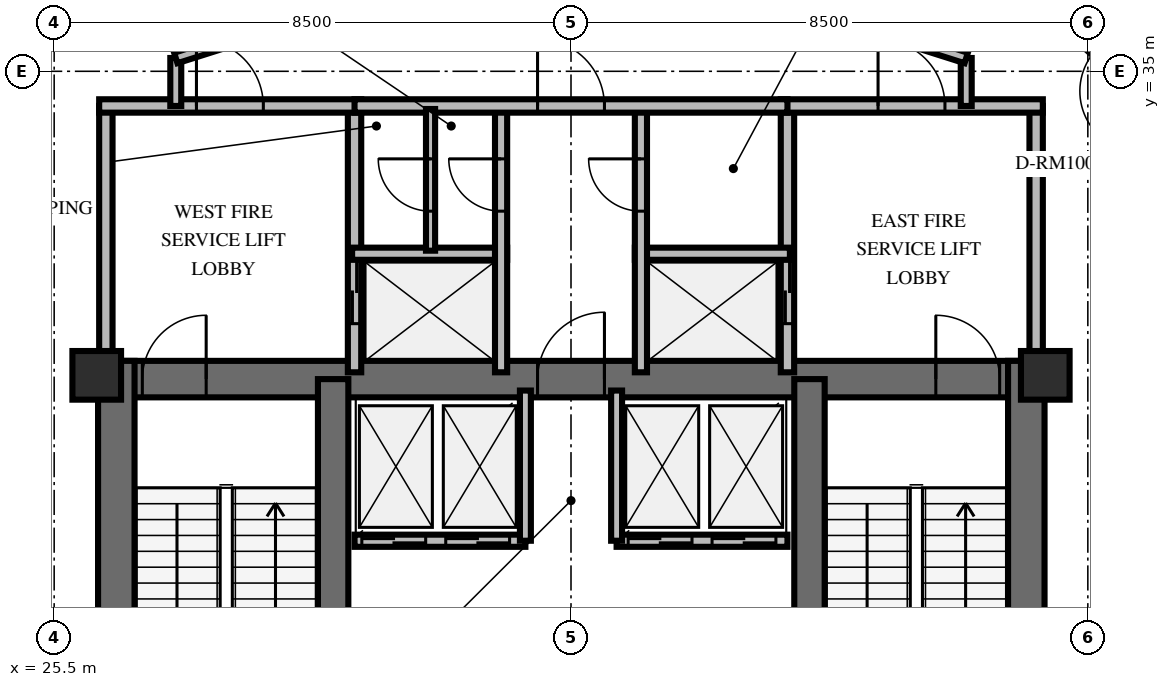
"""IFC4 building model, lengths in metres.
Left out: names, types, materials, properties, quantities, classifications, styles, units other than length and angle.
Written with IfcOpenShell. Run it as: python <this file> out.ifc"""

import sys

from ifc_helpers import new_model, si_unit, direction, frame, frame_2d, origin, origin_2d, place, context, subcontext, project, spatial, rectangle, extrude, element, fill, save


model = new_model("IFC4")
c1 = context("Model", 3, precision=1e-05, world=origin(), true_north=direction((0.0, 1.0)))
c2 = subcontext(c1, "Body", "Model", "MODEL_VIEW")
j1 = project(units=[si_unit("LENGTHUNIT", "METRE"), si_unit("PLANEANGLEUNIT", "RADIAN")], contexts=[c1])
p1 = place(None, origin())
s1 = spatial("IfcSite", under=j1, at=p1, CompositionType="ELEMENT")
p2 = place(p1, origin())
s2 = spatial("IfcBuilding", under=s1, at=p2, CompositionType="ELEMENT")
p3 = place(p2, frame((0.0, 0.0, 259.2)))
s3 = spatial("IfcBuildingStorey", under=s2, at=p3, CompositionType="ELEMENT", Elevation=259.2)
p4 = place(p3, frame((26.222, 29.938, 0.0), z_axis=(0.0, 0.0, 1.0), x_axis=(1.0, 0.0, 0.0)))
e1 = element("IfcWall", 1, at=p4, inside=s3, PredefinedType="SHEAR", context=c2, shape_type="SweptSolid", body=[
    extrude(rectangle(XDim=15.566, YDim=0.6, at=frame_2d((7.783, 0.0))), origin(), (0.0, 0.0, 1.0), 3.6),
])
p5 = place(p4, frame((0.728, 0.0, 0.0)))
e2 = element("IfcOpeningElement", 2, at=p5, cuts=e1, PredefinedType="OPENING", context=c2, shape_type="SweptSolid", body=[
    extrude(rectangle(XDim=1.05, YDim=2.15, at=frame_2d((0.525, 1.075))), frame((0.0, 0.31, 0.0), z_axis=(0.0, -1.0, 0.0), x_axis=(1.0, 0.0, 0.0)), (0.0, 0.0, 1.0), 0.62),
])
p6 = place(p4, frame((13.778, 0.0, 0.0)))
e3 = element("IfcOpeningElement", 3, at=p6, cuts=e1, PredefinedType="OPENING", context=c2, shape_type="SweptSolid", body=[
    extrude(rectangle(XDim=1.05, YDim=2.15, at=frame_2d((0.525, 1.075))), frame((0.0, 0.31, 0.0), z_axis=(0.0, -1.0, 0.0), x_axis=(1.0, 0.0, 0.0)), (0.0, 0.0, 1.0), 0.62),
])
p7 = place(p4, frame((7.228, 0.0, 0.0)))
e4 = element("IfcOpeningElement", 4, at=p7, cuts=e1, PredefinedType="OPENING", context=c2, shape_type="SweptSolid", body=[
    extrude(rectangle(XDim=1.1, YDim=2.15, at=frame_2d((0.55, 1.075))), frame((0.0, 0.31, 0.0), z_axis=(0.0, -1.0, 0.0), x_axis=(1.0, 0.0, 0.0)), (0.0, 0.0, 1.0), 0.62),
])
for number, where, z_axis, x_axis in (
    (5, (26.522, 19.962, 0.0), (0.0, 0.0, 1.0), (0.0, 1.0, 0.0)),
    (6, (41.488, 19.962, 0.0), (0.0, 0.0, 1.0), (0.0, 1.0, 0.0)),
):
    element("IfcWall", number, at=place(p3, frame(where, z_axis=z_axis, x_axis=x_axis)), inside=s3, PredefinedType="SHEAR", context=c2, shape_type="SweptSolid", body=[
        extrude(rectangle(XDim=10.276, YDim=0.6, at=frame_2d((5.138, 0.0))), origin(), (0.0, 0.0, 1.0), 3.6),
    ])
for number, where, z_axis, x_axis in (
    (7, (30.088, 20.262, 0.0), (0.0, 0.0, 1.0), (0.0, 1.0, 0.0)),
    (8, (37.922, 20.262, 0.0), (0.0, 0.0, 1.0), (0.0, 1.0, 0.0)),
):
    element("IfcWall", number, at=place(p3, frame(where, z_axis=z_axis, x_axis=x_axis)), inside=s3, PredefinedType="SHEAR", context=c2, shape_type="SweptSolid", body=[
        extrude(rectangle(XDim=9.676, YDim=0.5, at=frame_2d((4.838, 0.0))), origin(), (0.0, 0.0, 1.0), 3.6),
    ])
for number, where, z_axis, x_axis in (
    (9, (26.2, 30.0, 0.0), (0.0, 0.0, 1.0), (1.0, 0.0, 0.0)),
    (10, (41.8, 30.0, 0.0), (0.0, 0.0, 1.0), (1.0, 0.0, 0.0)),
):
    element("IfcColumn", number, at=place(p3, frame(where, z_axis=z_axis, x_axis=x_axis)), inside=s3, PredefinedType="PILASTER", context=c2, shape_type="SweptSolid", body=[
        extrude(rectangle(XDim=0.8, YDim=0.8, at=origin_2d()), origin(), (0.0, 0.0, 1.0), 3.6),
    ])
p8 = place(p3, frame((26.35, 30.05, 0.0), z_axis=(0.0, 0.0, 1.0), x_axis=(0.0, 1.0, 0.0)))
e11 = element("IfcWall", 11, at=p8, inside=s3, PredefinedType="SOLIDWALL", context=c2, shape_type="SweptSolid", body=[
    extrude(rectangle(XDim=4.38, YDim=0.22, at=frame_2d((2.19, 0.0))), origin(), (0.0, 0.0, 1.0), 2.46),
])
p9 = place(p3, frame((30.44, 30.05, 0.0), z_axis=(0.0, 0.0, 1.0), x_axis=(0.0, 1.0, 0.0)))
e12 = element("IfcWall", 12, at=p9, inside=s3, PredefinedType="SOLIDWALL", context=c2, shape_type="SweptSolid", body=[
    extrude(rectangle(XDim=4.38, YDim=0.22, at=frame_2d((2.19, 0.0))), origin(), (0.0, 0.0, 1.0), 2.46),
])
p10 = place(p9, frame((0.8, 0.0, 0.0)))
e13 = element("IfcOpeningElement", 13, at=p10, cuts=e12, PredefinedType="OPENING", context=c2, shape_type="SweptSolid", body=[
    extrude(rectangle(XDim=1.05, YDim=2.1, at=frame_2d((0.525, 1.05))), frame((0.0, 0.12, 0.0), z_axis=(0.0, -1.0, 0.0), x_axis=(1.0, 0.0, 0.0)), (0.0, 0.0, 1.0), 0.24),
])
p11 = place(p3, frame((26.24, 34.43, 0.0), z_axis=(0.0, 0.0, 1.0), x_axis=(1.0, 0.0, 0.0)))
e14 = element("IfcWall", 14, at=p11, inside=s3, PredefinedType="SOLIDWALL", context=c2, shape_type="SweptSolid", body=[
    extrude(rectangle(XDim=4.31, YDim=0.22, at=frame_2d((2.155, 0.0))), origin(), (0.0, 0.0, 1.0), 2.46),
])
p12 = place(p11, frame((1.6, 0.0, 0.0)))
e15 = element("IfcOpeningElement", 15, at=p12, cuts=e14, PredefinedType="OPENING", context=c2, shape_type="SweptSolid", body=[
    extrude(rectangle(XDim=1.1, YDim=2.15, at=frame_2d((0.55, 1.075))), frame((0.0, 0.12, 0.0), z_axis=(0.0, -1.0, 0.0), x_axis=(1.0, 0.0, 0.0)), (0.0, 0.0, 1.0), 0.24),
])
p13 = place(p3, frame((30.4, 32.0, 0.0), z_axis=(0.0, 0.0, 1.0), x_axis=(1.0, 0.0, 0.0)))
e16 = element("IfcWall", 16, at=p13, inside=s3, PredefinedType="SOLIDWALL", context=c2, shape_type="SweptSolid", body=[
    extrude(rectangle(XDim=2.55, YDim=0.2, at=frame_2d((1.275, 0.0))), origin(), (0.0, 0.0, 1.0), 2.46),
])
p14 = place(p3, frame((32.85, 30.05, 0.0), z_axis=(0.0, 0.0, 1.0), x_axis=(0.0, 1.0, 0.0)))
e17 = element("IfcWall", 17, at=p14, inside=s3, PredefinedType="SOLIDWALL", context=c2, shape_type="SweptSolid", body=[
    extrude(rectangle(XDim=4.38, YDim=0.2, at=frame_2d((2.19, 0.0))), origin(), (0.0, 0.0, 1.0), 2.46),
])
p15 = place(p14, frame((2.65, 0.0, 0.0)))
e18 = element("IfcOpeningElement", 18, at=p15, cuts=e17, PredefinedType="OPENING", context=c2, shape_type="SweptSolid", body=[
    extrude(rectangle(XDim=0.86, YDim=2.05, at=frame_2d((0.43, 1.025))), frame((0.0, 0.11, 0.0), z_axis=(0.0, -1.0, 0.0), x_axis=(1.0, 0.0, 0.0)), (0.0, 0.0, 1.0), 0.22),
])
p16 = place(p3, frame((37.56, 30.05, 0.0), z_axis=(0.0, 0.0, 1.0), x_axis=(0.0, 1.0, 0.0)))
e19 = element("IfcWall", 19, at=p16, inside=s3, PredefinedType="SOLIDWALL", context=c2, shape_type="SweptSolid", body=[
    extrude(rectangle(XDim=4.38, YDim=0.22, at=frame_2d((2.19, 0.0))), origin(), (0.0, 0.0, 1.0), 2.46),
])
p17 = place(p16, frame((0.8, 0.0, 0.0)))
e20 = element("IfcOpeningElement", 20, at=p17, cuts=e19, PredefinedType="OPENING", context=c2, shape_type="SweptSolid", body=[
    extrude(rectangle(XDim=1.05, YDim=2.1, at=frame_2d((0.525, 1.05))), frame((0.0, 0.12, 0.0), z_axis=(0.0, -1.0, 0.0), x_axis=(1.0, 0.0, 0.0)), (0.0, 0.0, 1.0), 0.24),
])
p18 = place(p3, frame((41.65, 30.05, 0.0), z_axis=(0.0, 0.0, 1.0), x_axis=(0.0, 1.0, 0.0)))
e21 = element("IfcWall", 21, at=p18, inside=s3, PredefinedType="SOLIDWALL", context=c2, shape_type="SweptSolid", body=[
    extrude(rectangle(XDim=4.38, YDim=0.22, at=frame_2d((2.19, 0.0))), origin(), (0.0, 0.0, 1.0), 2.46),
])
p19 = place(p3, frame((37.45, 34.43, 0.0), z_axis=(0.0, 0.0, 1.0), x_axis=(1.0, 0.0, 0.0)))
e22 = element("IfcWall", 22, at=p19, inside=s3, PredefinedType="SOLIDWALL", context=c2, shape_type="SweptSolid", body=[
    extrude(rectangle(XDim=4.31, YDim=0.22, at=frame_2d((2.155, 0.0))), origin(), (0.0, 0.0, 1.0), 2.46),
])
p20 = place(p19, frame((1.6, 0.0, 0.0)))
e23 = element("IfcOpeningElement", 23, at=p20, cuts=e22, PredefinedType="OPENING", context=c2, shape_type="SweptSolid", body=[
    extrude(rectangle(XDim=1.1, YDim=2.15, at=frame_2d((0.55, 1.075))), frame((0.0, 0.12, 0.0), z_axis=(0.0, -1.0, 0.0), x_axis=(1.0, 0.0, 0.0)), (0.0, 0.0, 1.0), 0.24),
])
p21 = place(p3, frame((35.05, 32.0, 0.0), z_axis=(0.0, 0.0, 1.0), x_axis=(1.0, 0.0, 0.0)))
e24 = element("IfcWall", 24, at=p21, inside=s3, PredefinedType="SOLIDWALL", context=c2, shape_type="SweptSolid", body=[
    extrude(rectangle(XDim=2.55, YDim=0.2, at=frame_2d((1.275, 0.0))), origin(), (0.0, 0.0, 1.0), 2.46),
])
p22 = place(p3, frame((35.15, 30.05, 0.0), z_axis=(0.0, 0.0, 1.0), x_axis=(0.0, 1.0, 0.0)))
e25 = element("IfcWall", 25, at=p22, inside=s3, PredefinedType="SOLIDWALL", context=c2, shape_type="SweptSolid", body=[
    extrude(rectangle(XDim=4.38, YDim=0.2, at=frame_2d((2.19, 0.0))), origin(), (0.0, 0.0, 1.0), 2.46),
])
p23 = place(p22, frame((2.65, 0.0, 0.0)))
e26 = element("IfcOpeningElement", 26, at=p23, cuts=e25, PredefinedType="OPENING", context=c2, shape_type="SweptSolid", body=[
    extrude(rectangle(XDim=0.86, YDim=2.05, at=frame_2d((0.43, 1.025))), frame((0.0, 0.11, 0.0), z_axis=(0.0, -1.0, 0.0), x_axis=(1.0, 0.0, 0.0)), (0.0, 0.0, 1.0), 0.22),
])
p24 = place(p3, frame((30.44, 34.43, 0.0), z_axis=(0.0, 0.0, 1.0), x_axis=(1.0, 0.0, 0.0)))
e27 = element("IfcWall", 27, at=p24, inside=s3, PredefinedType="SOLIDWALL", context=c2, shape_type="SweptSolid", body=[
    extrude(rectangle(XDim=7.12, YDim=0.22, at=frame_2d((3.56, 0.0))), origin(), (0.0, 0.0, 1.0), 2.46),
])
p25 = place(p24, frame((3.01, 0.0, 0.0)))
e28 = element("IfcOpeningElement", 28, at=p25, cuts=e27, PredefinedType="OPENING", context=c2, shape_type="SweptSolid", body=[
    extrude(rectangle(XDim=1.1, YDim=2.15, at=frame_2d((0.55, 1.075))), frame((0.0, 0.12, 0.0), z_axis=(0.0, -1.0, 0.0), x_axis=(1.0, 0.0, 0.0)), (0.0, 0.0, 1.0), 0.24),
])
p26 = place(p3, frame((31.69, 32.05, 0.0), z_axis=(0.0, 0.0, 1.0), x_axis=(0.0, 1.0, 0.0)))
e29 = element("IfcWall", 29, at=p26, inside=s3, PredefinedType="PARTITIONING", context=c2, shape_type="SweptSolid", body=[
    extrude(rectangle(XDim=2.33, YDim=0.15, at=frame_2d((1.165, 0.0))), origin(), (0.0, 0.0, 1.0), 2.46),
])
p27 = place(p26, frame((0.65, 0.0, 0.0)))
e30 = element("IfcOpeningElement", 30, at=p27, cuts=e29, PredefinedType="OPENING", context=c2, shape_type="SweptSolid", body=[
    extrude(rectangle(XDim=0.86, YDim=2.05, at=frame_2d((0.43, 1.025))), frame((0.0, 0.085, 0.0), z_axis=(0.0, -1.0, 0.0), x_axis=(1.0, 0.0, 0.0)), (0.0, 0.0, 1.0), 0.17),
])
p28 = place(p3, frame((30.44, 27.28, 0.0), z_axis=(0.0, 0.0, 1.0), x_axis=(1.0, 0.0, 0.0)))
e31 = element("IfcWall", 31, at=p28, inside=s3, PredefinedType="SOLIDWALL", context=c2, shape_type="SweptSolid", body=[
    extrude(rectangle(XDim=2.81, YDim=0.2, at=frame_2d((1.405, 0.0))), origin(), (0.0, 0.0, 1.0), 2.46),
])
p29 = place(p28, frame((0.12, 0.0, 0.0)))
e32 = element("IfcOpeningElement", 32, at=p29, cuts=e31, PredefinedType="OPENING", context=c2, shape_type="SweptSolid", body=[
    extrude(rectangle(XDim=1.05, YDim=2.1, at=frame_2d((0.525, 1.05))), frame((0.0, 0.11, 0.0), z_axis=(0.0, -1.0, 0.0), x_axis=(1.0, 0.0, 0.0)), (0.0, 0.0, 1.0), 0.22),
])
p30 = place(p28, frame((1.5, 0.0, 0.0)))
e33 = element("IfcOpeningElement", 33, at=p30, cuts=e31, PredefinedType="OPENING", context=c2, shape_type="SweptSolid", body=[
    extrude(rectangle(XDim=1.05, YDim=2.1, at=frame_2d((0.525, 1.05))), frame((0.0, 0.11, 0.0), z_axis=(0.0, -1.0, 0.0), x_axis=(1.0, 0.0, 0.0)), (0.0, 0.0, 1.0), 0.22),
])
p31 = place(p3, frame((33.25, 27.28, 0.0), z_axis=(0.0, 0.0, 1.0), x_axis=(0.0, 1.0, 0.0)))
e34 = element("IfcWall", 34, at=p31, inside=s3, PredefinedType="SOLIDWALL", context=c2, shape_type="SweptSolid", body=[
    extrude(rectangle(XDim=2.47, YDim=0.18, at=frame_2d((1.235, 0.0))), origin(), (0.0, 0.0, 1.0), 2.46),
])
p32 = place(p3, frame((34.75, 27.28, 0.0), z_axis=(0.0, 0.0, 1.0), x_axis=(1.0, 0.0, 0.0)))
e35 = element("IfcWall", 35, at=p32, inside=s3, PredefinedType="SOLIDWALL", context=c2, shape_type="SweptSolid", body=[
    extrude(rectangle(XDim=2.81, YDim=0.2, at=frame_2d((1.405, 0.0))), origin(), (0.0, 0.0, 1.0), 2.46),
])
p33 = place(p32, frame((0.19, 0.0, 0.0)))
e36 = element("IfcOpeningElement", 36, at=p33, cuts=e35, PredefinedType="OPENING", context=c2, shape_type="SweptSolid", body=[
    extrude(rectangle(XDim=1.05, YDim=2.1, at=frame_2d((0.525, 1.05))), frame((0.0, 0.11, 0.0), z_axis=(0.0, -1.0, 0.0), x_axis=(1.0, 0.0, 0.0)), (0.0, 0.0, 1.0), 0.22),
])
p34 = place(p32, frame((1.57, 0.0, 0.0)))
e37 = element("IfcOpeningElement", 37, at=p34, cuts=e35, PredefinedType="OPENING", context=c2, shape_type="SweptSolid", body=[
    extrude(rectangle(XDim=1.05, YDim=2.1, at=frame_2d((0.525, 1.05))), frame((0.0, 0.11, 0.0), z_axis=(0.0, -1.0, 0.0), x_axis=(1.0, 0.0, 0.0)), (0.0, 0.0, 1.0), 0.22),
])
p35 = place(p3, frame((34.75, 27.28, 0.0), z_axis=(0.0, 0.0, 1.0), x_axis=(0.0, 1.0, 0.0)))
e38 = element("IfcWall", 38, at=p35, inside=s3, PredefinedType="SOLIDWALL", context=c2, shape_type="SweptSolid", body=[
    extrude(rectangle(XDim=2.47, YDim=0.18, at=frame_2d((1.235, 0.0))), origin(), (0.0, 0.0, 1.0), 2.46),
])
for number, where, z_axis, x_axis in (
    (39, (27.5, 34.43, 0.0), (0.0, 0.0, 1.0), (0.0, 1.0, 0.0)),
    (40, (40.5, 35.219, 0.0), (0.0, 0.0, 1.0), (0.0, -1.0, 0.0)),
):
    element("IfcWall", number, at=place(p3, frame(where, z_axis=z_axis, x_axis=x_axis)), inside=s3, PredefinedType="PARTITIONING", context=c2, shape_type="SweptSolid", body=[
        extrude(rectangle(XDim=0.789, YDim=0.18, at=frame_2d((0.395, 0.0))), origin(), (0.0, 0.0, 1.0), 2.46),
    ])
p36 = place(p3, frame((27.5, 35.219, 0.0), z_axis=(0.0, 0.0, 1.0), x_axis=(0.953228121756, 0.302251795518, 0.0)))
e41 = element("IfcWall", 41, at=p36, inside=s3, PredefinedType="PARTITIONING", context=c2, shape_type="SweptSolid", body=[
    extrude(rectangle(XDim=6.819, YDim=0.18, at=frame_2d((3.409, 0.0))), origin(), (0.0, 0.0, 1.0), 2.46),
])
p37 = place(p36, frame((2.86, 0.0, 0.0)))
e42 = element("IfcOpeningElement", 42, at=p37, cuts=e41, PredefinedType="OPENING", context=c2, shape_type="SweptSolid", body=[
    extrude(rectangle(XDim=1.1, YDim=2.15, at=frame_2d((0.55, 1.075))), frame((0.0, 0.1, 0.0), z_axis=(0.0, -1.0, 0.0), x_axis=(1.0, 0.0, 0.0)), (0.0, 0.0, 1.0), 0.2),
])
p38 = place(p3, frame((34.0, 37.28, 0.0), z_axis=(0.0, 0.0, 1.0), x_axis=(0.953228121756, -0.302251795518, 0.0)))
e43 = element("IfcWall", 43, at=p38, inside=s3, PredefinedType="PARTITIONING", context=c2, shape_type="SweptSolid", body=[
    extrude(rectangle(XDim=6.819, YDim=0.18, at=frame_2d((3.409, 0.0))), origin(), (0.0, 0.0, 1.0), 2.46),
])
p39 = place(p38, frame((2.86, 0.0, 0.0)))
e44 = element("IfcOpeningElement", 44, at=p39, cuts=e43, PredefinedType="OPENING", context=c2, shape_type="SweptSolid", body=[
    extrude(rectangle(XDim=1.1, YDim=2.15, at=frame_2d((0.55, 1.075))), frame((0.0, 0.1, 0.0), z_axis=(0.0, -1.0, 0.0), x_axis=(1.0, 0.0, 0.0)), (0.0, 0.0, 1.0), 0.2),
])
p40 = place(p3, frame((43.988, 34.117, 0.0), z_axis=(0.0, 0.0, 1.0), x_axis=(-0.744300239782, 0.6678451565, 0.0)))
e45 = element("IfcWall", 45, at=p40, inside=s3, PredefinedType="PARTITIONING", context=c2, shape_type="SweptSolid", body=[
    extrude(rectangle(XDim=4.027, YDim=0.18, at=frame_2d((2.013, 0.0))), origin(), (0.0, 0.0, 1.0), 2.46),
])
p41 = place(p40, frame((0.832, 0.0, 0.0)))
e46 = element("IfcOpeningElement", 46, at=p41, cuts=e45, PredefinedType="OPENING", context=c2, shape_type="SweptSolid", body=[
    extrude(rectangle(XDim=1.0, YDim=2.15, at=frame_2d((0.5, 1.075))), frame((0.0, 0.1, 0.0), z_axis=(0.0, -1.0, 0.0), x_axis=(1.0, 0.0, 0.0)), (0.0, 0.0, 1.0), 0.2),
])
p42 = place(p3, frame((28.541, 37.655, 0.0), z_axis=(0.0, 0.0, 1.0), x_axis=(-0.818142386299, -0.57501568304, 0.0)))
e47 = element("IfcWall", 47, at=p42, inside=s3, PredefinedType="PARTITIONING", context=c2, shape_type="SweptSolid", body=[
    extrude(rectangle(XDim=4.469, YDim=0.18, at=frame_2d((2.235, 0.0))), origin(), (0.0, 0.0, 1.0), 2.46),
])
p43 = place(p5, origin())
e48 = element("IfcDoor", 48, at=p43, inside=s3, OperationType="SINGLE_SWING_RIGHT", PredefinedType="DOOR", context=c2, shape_type="SweptSolid", body=[
    extrude(rectangle(XDim=1.05, YDim=2.15, at=frame_2d((0.525, 1.075))), frame((0.0, 0.025, 0.0), z_axis=(0.0, -1.0, 0.0), x_axis=(1.0, 0.0, 0.0)), (0.0, 0.0, 1.0), 0.05),
])
fill(e2, e48)
p44 = place(p6, origin())
e49 = element("IfcDoor", 49, at=p44, inside=s3, OperationType="SINGLE_SWING_LEFT", PredefinedType="DOOR", context=c2, shape_type="SweptSolid", body=[
    extrude(rectangle(XDim=1.05, YDim=2.15, at=frame_2d((0.525, 1.075))), frame((0.0, 0.025, 0.0), z_axis=(0.0, -1.0, 0.0), x_axis=(1.0, 0.0, 0.0)), (0.0, 0.0, 1.0), 0.05),
])
fill(e3, e49)
p45 = place(p7, origin())
e50 = element("IfcDoor", 50, at=p45, inside=s3, OperationType="SINGLE_SWING_RIGHT", PredefinedType="DOOR", context=c2, shape_type="SweptSolid", body=[
    extrude(rectangle(XDim=1.1, YDim=2.15, at=frame_2d((0.55, 1.075))), frame((0.0, 0.025, 0.0), z_axis=(0.0, -1.0, 0.0), x_axis=(1.0, 0.0, 0.0)), (0.0, 0.0, 1.0), 0.05),
])
fill(e4, e50)
p46 = place(p12, origin())
e51 = element("IfcDoor", 51, at=p46, inside=s3, OperationType="SINGLE_SWING_LEFT", PredefinedType="DOOR", context=c2, shape_type="SweptSolid", body=[
    extrude(rectangle(XDim=1.1, YDim=2.15, at=frame_2d((0.55, 1.075))), frame((0.0, 0.025, 0.0), z_axis=(0.0, -1.0, 0.0), x_axis=(1.0, 0.0, 0.0)), (0.0, 0.0, 1.0), 0.05),
])
fill(e15, e51)
p47 = place(p10, origin())
e52 = element("IfcDoor", 52, at=p47, inside=s3, OperationType="DOUBLE_DOOR_SLIDING", PredefinedType="USERDEFINED", context=c2, shape_type="SweptSolid", body=[
    extrude(rectangle(XDim=1.05, YDim=2.1, at=frame_2d((0.525, 1.05))), frame((0.0, 0.025, 0.0), z_axis=(0.0, -1.0, 0.0), x_axis=(1.0, 0.0, 0.0)), (0.0, 0.0, 1.0), 0.05),
])
fill(e13, e52)
p48 = place(p15, origin())
e53 = element("IfcDoor", 53, at=p48, inside=s3, OperationType="SINGLE_SWING_RIGHT", PredefinedType="TRAPDOOR", context=c2, shape_type="SweptSolid", body=[
    extrude(rectangle(XDim=0.86, YDim=2.05, at=frame_2d((0.43, 1.025))), frame((0.0, 0.025, 0.0), z_axis=(0.0, -1.0, 0.0), x_axis=(1.0, 0.0, 0.0)), (0.0, 0.0, 1.0), 0.05),
])
fill(e18, e53)
p49 = place(p20, origin())
e54 = element("IfcDoor", 54, at=p49, inside=s3, OperationType="SINGLE_SWING_LEFT", PredefinedType="DOOR", context=c2, shape_type="SweptSolid", body=[
    extrude(rectangle(XDim=1.1, YDim=2.15, at=frame_2d((0.55, 1.075))), frame((0.0, 0.025, 0.0), z_axis=(0.0, -1.0, 0.0), x_axis=(1.0, 0.0, 0.0)), (0.0, 0.0, 1.0), 0.05),
])
fill(e23, e54)
p50 = place(p17, origin())
e55 = element("IfcDoor", 55, at=p50, inside=s3, OperationType="DOUBLE_DOOR_SLIDING", PredefinedType="USERDEFINED", context=c2, shape_type="SweptSolid", body=[
    extrude(rectangle(XDim=1.05, YDim=2.1, at=frame_2d((0.525, 1.05))), frame((0.0, 0.025, 0.0), z_axis=(0.0, -1.0, 0.0), x_axis=(1.0, 0.0, 0.0)), (0.0, 0.0, 1.0), 0.05),
])
fill(e20, e55)
p51 = place(p23, origin())
e56 = element("IfcDoor", 56, at=p51, inside=s3, OperationType="SINGLE_SWING_RIGHT", PredefinedType="TRAPDOOR", context=c2, shape_type="SweptSolid", body=[
    extrude(rectangle(XDim=0.86, YDim=2.05, at=frame_2d((0.43, 1.025))), frame((0.0, 0.025, 0.0), z_axis=(0.0, -1.0, 0.0), x_axis=(1.0, 0.0, 0.0)), (0.0, 0.0, 1.0), 0.05),
])
fill(e26, e56)
p52 = place(p25, origin())
e57 = element("IfcDoor", 57, at=p52, inside=s3, OperationType="SINGLE_SWING_LEFT", PredefinedType="DOOR", context=c2, shape_type="SweptSolid", body=[
    extrude(rectangle(XDim=1.1, YDim=2.15, at=frame_2d((0.55, 1.075))), frame((0.0, 0.025, 0.0), z_axis=(0.0, -1.0, 0.0), x_axis=(1.0, 0.0, 0.0)), (0.0, 0.0, 1.0), 0.05),
])
fill(e28, e57)
p53 = place(p27, origin())
e58 = element("IfcDoor", 58, at=p53, inside=s3, OperationType="SINGLE_SWING_RIGHT", PredefinedType="TRAPDOOR", context=c2, shape_type="SweptSolid", body=[
    extrude(rectangle(XDim=0.86, YDim=2.05, at=frame_2d((0.43, 1.025))), frame((0.0, 0.025, 0.0), z_axis=(0.0, -1.0, 0.0), x_axis=(1.0, 0.0, 0.0)), (0.0, 0.0, 1.0), 0.05),
])
fill(e30, e58)
p54 = place(p29, origin())
e59 = element("IfcDoor", 59, at=p54, inside=s3, OperationType="DOUBLE_DOOR_SLIDING", PredefinedType="USERDEFINED", context=c2, shape_type="SweptSolid", body=[
    extrude(rectangle(XDim=1.05, YDim=2.1, at=frame_2d((0.525, 1.05))), frame((0.0, 0.025, 0.0), z_axis=(0.0, -1.0, 0.0), x_axis=(1.0, 0.0, 0.0)), (0.0, 0.0, 1.0), 0.05),
])
fill(e32, e59)
p55 = place(p30, origin())
e60 = element("IfcDoor", 60, at=p55, inside=s3, OperationType="DOUBLE_DOOR_SLIDING", PredefinedType="USERDEFINED", context=c2, shape_type="SweptSolid", body=[
    extrude(rectangle(XDim=1.05, YDim=2.1, at=frame_2d((0.525, 1.05))), frame((0.0, 0.025, 0.0), z_axis=(0.0, -1.0, 0.0), x_axis=(1.0, 0.0, 0.0)), (0.0, 0.0, 1.0), 0.05),
])
fill(e33, e60)
p56 = place(p33, origin())
e61 = element("IfcDoor", 61, at=p56, inside=s3, OperationType="DOUBLE_DOOR_SLIDING", PredefinedType="USERDEFINED", context=c2, shape_type="SweptSolid", body=[
    extrude(rectangle(XDim=1.05, YDim=2.1, at=frame_2d((0.525, 1.05))), frame((0.0, 0.025, 0.0), z_axis=(0.0, -1.0, 0.0), x_axis=(1.0, 0.0, 0.0)), (0.0, 0.0, 1.0), 0.05),
])
fill(e36, e61)
p57 = place(p34, origin())
e62 = element("IfcDoor", 62, at=p57, inside=s3, OperationType="DOUBLE_DOOR_SLIDING", PredefinedType="USERDEFINED", context=c2, shape_type="SweptSolid", body=[
    extrude(rectangle(XDim=1.05, YDim=2.1, at=frame_2d((0.525, 1.05))), frame((0.0, 0.025, 0.0), z_axis=(0.0, -1.0, 0.0), x_axis=(1.0, 0.0, 0.0)), (0.0, 0.0, 1.0), 0.05),
])
fill(e37, e62)
save(model, sys.argv[1])
